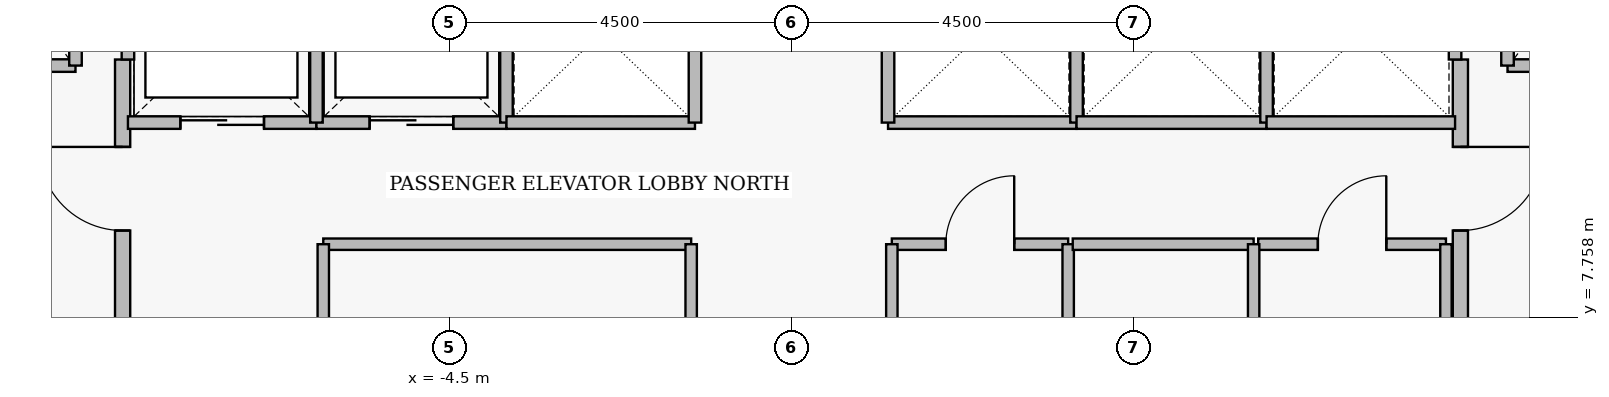
"""IFC4 building model, lengths in metres.
Left out: names, types, materials, properties, quantities, classifications, styles, units other than length and angle.
Written with IfcOpenShell. Run it as: python <this file> out.ifc"""

import sys

from ifc_helpers import new_model, si_unit, direction, frame, frame_2d, origin, place, context, subcontext, project, spatial, rectangle, extrude, element, fill, save


model = new_model("IFC4")
c1 = context("Model", 3, precision=1e-05, world=origin(), true_north=direction((0.0, 1.0)))
c2 = subcontext(c1, "Body", "Model", "MODEL_VIEW")
j1 = project(units=[si_unit("LENGTHUNIT", "METRE"), si_unit("PLANEANGLEUNIT", "RADIAN")], contexts=[c1])
p1 = place(None, origin())
s1 = spatial("IfcSite", under=j1, at=p1, CompositionType="ELEMENT")
p2 = place(p1, origin())
s2 = spatial("IfcBuilding", under=s1, at=p2, CompositionType="ELEMENT")
p3 = place(p2, frame((0.0, 0.0, 128.5)))
s3 = spatial("IfcBuildingStorey", under=s2, at=p3, CompositionType="ELEMENT", Elevation=128.5)
p4 = place(p3, frame((-8.8, 5.05, 0.0), z_axis=(0.0, 0.0, 1.0), x_axis=(0.0, 1.0, 0.0)))
e1 = element("IfcWall", 1, at=p4, inside=s3, PredefinedType="PARTITIONING", context=c2, shape_type="SweptSolid", body=[
    extrude(rectangle(XDim=6.1, YDim=0.2, at=frame_2d((3.05, 0.0))), origin(), (0.0, 0.0, 1.0), 3.43),
])
p5 = place(p4, frame((0.25, 0.0, 0.0)))
e2 = element("IfcOpeningElement", 2, at=p5, cuts=e1, PredefinedType="OPENING", context=c2, shape_type="SweptSolid", body=[
    extrude(rectangle(XDim=1.1, YDim=2.2, at=frame_2d((0.55, 1.1))), frame((0.0, 0.11, 0.0), z_axis=(0.0, -1.0, 0.0), x_axis=(1.0, 0.0, 0.0)), (0.0, 0.0, 1.0), 0.22),
])
p6 = place(p4, frame((3.85, 0.0, 0.0)))
e3 = element("IfcOpeningElement", 3, at=p6, cuts=e1, PredefinedType="OPENING", context=c2, shape_type="SweptSolid", body=[
    extrude(rectangle(XDim=1.1, YDim=2.2, at=frame_2d((0.55, 1.1))), frame((0.0, 0.11, 0.0), z_axis=(0.0, -1.0, 0.0), x_axis=(1.0, 0.0, 0.0)), (0.0, 0.0, 1.0), 0.22),
])
p7 = place(p3, frame((8.8, 11.15, 0.0), z_axis=(0.0, 0.0, 1.0), x_axis=(0.0, -1.0, 0.0)))
e4 = element("IfcWall", 4, at=p7, inside=s3, PredefinedType="PARTITIONING", context=c2, shape_type="SweptSolid", body=[
    extrude(rectangle(XDim=6.1, YDim=0.2, at=frame_2d((3.05, 0.0))), origin(), (0.0, 0.0, 1.0), 3.43),
])
p8 = place(p7, frame((1.15, 0.0, 0.0)))
e5 = element("IfcOpeningElement", 5, at=p8, cuts=e4, PredefinedType="OPENING", context=c2, shape_type="SweptSolid", body=[
    extrude(rectangle(XDim=1.1, YDim=2.2, at=frame_2d((0.55, 1.1))), frame((0.0, 0.11, 0.0), z_axis=(0.0, -1.0, 0.0), x_axis=(1.0, 0.0, 0.0)), (0.0, 0.0, 1.0), 0.22),
])
p9 = place(p7, frame((4.75, 0.0, 0.0)))
e6 = element("IfcOpeningElement", 6, at=p9, cuts=e4, PredefinedType="OPENING", context=c2, shape_type="SweptSolid", body=[
    extrude(rectangle(XDim=1.1, YDim=2.2, at=frame_2d((0.55, 1.1))), frame((0.0, 0.11, 0.0), z_axis=(0.0, -1.0, 0.0), x_axis=(1.0, 0.0, 0.0)), (0.0, 0.0, 1.0), 0.22),
])
p10 = place(p3, frame((-11.58, 11.07, 0.0), z_axis=(0.0, 0.0, 1.0), x_axis=(1.0, 0.0, 0.0)))
e7 = element("IfcWall", 7, at=p10, inside=s3, PredefinedType="PARTITIONING", context=c2, shape_type="SweptSolid", body=[
    extrude(rectangle(XDim=2.16, YDim=0.165, at=frame_2d((1.08, 0.0))), origin(), (0.0, 0.0, 1.0), 3.43),
])
p11 = place(p10, frame((0.53, 0.0, 0.0)))
e8 = element("IfcOpeningElement", 8, at=p11, cuts=e7, PredefinedType="OPENING", context=c2, shape_type="SweptSolid", body=[
    extrude(rectangle(XDim=1.15, YDim=2.25, at=frame_2d((0.575, 1.125))), frame((0.0, 0.093, 0.0), z_axis=(0.0, -1.0, 0.0), x_axis=(1.0, 0.0, 0.0)), (0.0, 0.0, 1.0), 0.185),
])
p12 = place(p3, frame((9.42, 11.07, 0.0), z_axis=(0.0, 0.0, 1.0), x_axis=(1.0, 0.0, 0.0)))
e9 = element("IfcWall", 9, at=p12, inside=s3, PredefinedType="PARTITIONING", context=c2, shape_type="SweptSolid", body=[
    extrude(rectangle(XDim=2.16, YDim=0.165, at=frame_2d((1.08, 0.0))), origin(), (0.0, 0.0, 1.0), 3.43),
])
p13 = place(p12, frame((0.53, 0.0, 0.0)))
e10 = element("IfcOpeningElement", 10, at=p13, cuts=e9, PredefinedType="OPENING", context=c2, shape_type="SweptSolid", body=[
    extrude(rectangle(XDim=1.15, YDim=2.25, at=frame_2d((0.575, 1.125))), frame((0.0, 0.093, 0.0), z_axis=(0.0, -1.0, 0.0), x_axis=(1.0, 0.0, 0.0)), (0.0, 0.0, 1.0), 0.185),
])
p14 = place(p3, frame((-8.73, 10.32, 0.0), z_axis=(0.0, 0.0, 1.0), x_axis=(1.0, 0.0, 0.0)))
e11 = element("IfcWall", 11, at=p14, inside=s3, PredefinedType="PARTITIONING", context=c2, shape_type="SweptSolid", body=[
    extrude(rectangle(XDim=2.48, YDim=0.165, at=frame_2d((1.24, 0.0))), origin(), (0.0, 0.0, 1.0), 3.43),
])
p15 = place(p14, frame((0.69, 0.0, 0.0)))
e12 = element("IfcOpeningElement", 12, at=p15, cuts=e11, PredefinedType="OPENING", context=c2, shape_type="SweptSolid", body=[
    extrude(rectangle(XDim=1.1, YDim=2.25, at=frame_2d((0.55, 1.125))), frame((0.0, 0.093, 0.0), z_axis=(0.0, -1.0, 0.0), x_axis=(1.0, 0.0, 0.0)), (0.0, 0.0, 1.0), 0.185),
])
p16 = place(p3, frame((-6.25, 10.32, 0.0), z_axis=(0.0, 0.0, 1.0), x_axis=(1.0, 0.0, 0.0)))
e13 = element("IfcWall", 13, at=p16, inside=s3, PredefinedType="PARTITIONING", context=c2, shape_type="SweptSolid", body=[
    extrude(rectangle(XDim=2.5, YDim=0.165, at=frame_2d((1.25, 0.0))), origin(), (0.0, 0.0, 1.0), 3.43),
])
p17 = place(p16, frame((0.7, 0.0, 0.0)))
e14 = element("IfcOpeningElement", 14, at=p17, cuts=e13, PredefinedType="OPENING", context=c2, shape_type="SweptSolid", body=[
    extrude(rectangle(XDim=1.1, YDim=2.25, at=frame_2d((0.55, 1.125))), frame((0.0, 0.093, 0.0), z_axis=(0.0, -1.0, 0.0), x_axis=(1.0, 0.0, 0.0)), (0.0, 0.0, 1.0), 0.185),
])
p18 = place(p3, frame((1.32, 8.72, 0.0), z_axis=(0.0, 0.0, 1.0), x_axis=(1.0, 0.0, 0.0)))
e15 = element("IfcWall", 15, at=p18, inside=s3, PredefinedType="PARTITIONING", context=c2, shape_type="SweptSolid", body=[
    extrude(rectangle(XDim=2.32, YDim=0.15, at=frame_2d((1.16, 0.0))), origin(), (0.0, 0.0, 1.0), 3.43),
])
p19 = place(p18, frame((0.71, 0.0, 0.0)))
e16 = element("IfcOpeningElement", 16, at=p19, cuts=e15, PredefinedType="OPENING", context=c2, shape_type="SweptSolid", body=[
    extrude(rectangle(XDim=0.9, YDim=2.15, at=frame_2d((0.45, 1.075))), frame((0.0, 0.085, 0.0), z_axis=(0.0, -1.0, 0.0), x_axis=(1.0, 0.0, 0.0)), (0.0, 0.0, 1.0), 0.17),
])
p20 = place(p3, frame((6.14, 8.72, 0.0), z_axis=(0.0, 0.0, 1.0), x_axis=(1.0, 0.0, 0.0)))
e17 = element("IfcWall", 17, at=p20, inside=s3, PredefinedType="PARTITIONING", context=c2, shape_type="SweptSolid", body=[
    extrude(rectangle(XDim=2.47, YDim=0.15, at=frame_2d((1.235, 0.0))), origin(), (0.0, 0.0, 1.0), 3.43),
])
p21 = place(p20, frame((0.785, 0.0, 0.0)))
e18 = element("IfcOpeningElement", 18, at=p21, cuts=e17, PredefinedType="OPENING", context=c2, shape_type="SweptSolid", body=[
    extrude(rectangle(XDim=0.9, YDim=2.15, at=frame_2d((0.45, 1.075))), frame((0.0, 0.085, 0.0), z_axis=(0.0, -1.0, 0.0), x_axis=(1.0, 0.0, 0.0)), (0.0, 0.0, 1.0), 0.17),
])
for number, where, z_axis, x_axis in (
    (19, (-9.42, 11.07, 0.0), (0.0, 0.0, 1.0), (0.0, 1.0, 0.0)),
    (20, (9.42, 11.07, 0.0), (0.0, 0.0, 1.0), (0.0, 1.0, 0.0)),
):
    element("IfcWall", number, at=place(p3, frame(where, z_axis=z_axis, x_axis=x_axis)), inside=s3, PredefinedType="PARTITIONING", context=c2, shape_type="SweptSolid", body=[
        extrude(rectangle(XDim=2.96, YDim=0.165, at=frame_2d((1.48, 0.0))), origin(), (0.0, 0.0, 1.0), 3.43),
    ])
p22 = place(p3, frame((-8.73, 11.15, 0.0), z_axis=(0.0, 0.0, 1.0), x_axis=(0.0, 1.0, 0.0)))
e21 = element("IfcWall", 21, at=p22, inside=s3, PredefinedType="PARTITIONING", context=c2, shape_type="SweptSolid", body=[
    extrude(rectangle(XDim=1.53, YDim=0.165, at=frame_2d((0.765, 0.0))), origin(), (0.0, 0.0, 1.0), 3.43),
])
for number, where, z_axis, x_axis in (
    (22, (-6.25, 10.32, 0.0), (0.0, 0.0, 1.0), (0.0, 1.0, 0.0)),
    (23, (-3.75, 10.32, 0.0), (0.0, 0.0, 1.0), (0.0, 1.0, 0.0)),
):
    element("IfcWall", number, at=place(p3, frame(where, z_axis=z_axis, x_axis=x_axis)), inside=s3, PredefinedType="PARTITIONING", context=c2, shape_type="SweptSolid", body=[
        extrude(rectangle(XDim=2.36, YDim=0.165, at=frame_2d((1.18, 0.0))), origin(), (0.0, 0.0, 1.0), 3.43),
    ])
p23 = place(p3, frame((-3.75, 10.32, 0.0), z_axis=(0.0, 0.0, 1.0), x_axis=(1.0, 0.0, 0.0)))
e24 = element("IfcWall", 24, at=p23, inside=s3, PredefinedType="PARTITIONING", context=c2, shape_type="SweptSolid", body=[
    extrude(rectangle(XDim=2.48, YDim=0.165, at=frame_2d((1.24, 0.0))), origin(), (0.0, 0.0, 1.0), 3.43),
])
p24 = place(p3, frame((-1.27, 10.32, 0.0), z_axis=(0.0, 0.0, 1.0), x_axis=(0.0, 1.0, 0.0)))
e25 = element("IfcWall", 25, at=p24, inside=s3, PredefinedType="PARTITIONING", context=c2, shape_type="SweptSolid", body=[
    extrude(rectangle(XDim=2.36, YDim=0.165, at=frame_2d((1.18, 0.0))), origin(), (0.0, 0.0, 1.0), 3.43),
])
p25 = place(p3, frame((1.27, 10.32, 0.0), z_axis=(0.0, 0.0, 1.0), x_axis=(1.0, 0.0, 0.0)))
e26 = element("IfcWall", 26, at=p25, inside=s3, PredefinedType="PARTITIONING", context=c2, shape_type="SweptSolid", body=[
    extrude(rectangle(XDim=2.48, YDim=0.165, at=frame_2d((1.24, 0.0))), origin(), (0.0, 0.0, 1.0), 3.43),
])
for number, where, z_axis, x_axis in (
    (27, (1.27, 10.32, 0.0), (0.0, 0.0, 1.0), (0.0, 1.0, 0.0)),
    (28, (3.75, 10.32, 0.0), (0.0, 0.0, 1.0), (0.0, 1.0, 0.0)),
):
    element("IfcWall", number, at=place(p3, frame(where, z_axis=z_axis, x_axis=x_axis)), inside=s3, PredefinedType="PARTITIONING", context=c2, shape_type="SweptSolid", body=[
        extrude(rectangle(XDim=2.36, YDim=0.165, at=frame_2d((1.18, 0.0))), origin(), (0.0, 0.0, 1.0), 3.43),
    ])
p26 = place(p3, frame((3.75, 10.32, 0.0), z_axis=(0.0, 0.0, 1.0), x_axis=(1.0, 0.0, 0.0)))
e29 = element("IfcWall", 29, at=p26, inside=s3, PredefinedType="PARTITIONING", context=c2, shape_type="SweptSolid", body=[
    extrude(rectangle(XDim=2.5, YDim=0.165, at=frame_2d((1.25, 0.0))), origin(), (0.0, 0.0, 1.0), 3.43),
])
p27 = place(p3, frame((6.25, 10.32, 0.0), z_axis=(0.0, 0.0, 1.0), x_axis=(0.0, 1.0, 0.0)))
e30 = element("IfcWall", 30, at=p27, inside=s3, PredefinedType="PARTITIONING", context=c2, shape_type="SweptSolid", body=[
    extrude(rectangle(XDim=2.36, YDim=0.165, at=frame_2d((1.18, 0.0))), origin(), (0.0, 0.0, 1.0), 3.43),
])
p28 = place(p3, frame((6.25, 10.32, 0.0), z_axis=(0.0, 0.0, 1.0), x_axis=(1.0, 0.0, 0.0)))
e31 = element("IfcWall", 31, at=p28, inside=s3, PredefinedType="PARTITIONING", context=c2, shape_type="SweptSolid", body=[
    extrude(rectangle(XDim=2.48, YDim=0.165, at=frame_2d((1.24, 0.0))), origin(), (0.0, 0.0, 1.0), 3.43),
])
p29 = place(p3, frame((8.73, 11.15, 0.0), z_axis=(0.0, 0.0, 1.0), x_axis=(0.0, 1.0, 0.0)))
e32 = element("IfcWall", 32, at=p29, inside=s3, PredefinedType="PARTITIONING", context=c2, shape_type="SweptSolid", body=[
    extrude(rectangle(XDim=1.53, YDim=0.165, at=frame_2d((0.765, 0.0))), origin(), (0.0, 0.0, 1.0), 3.43),
])
p30 = place(p3, frame((-6.16, 8.72, 0.0), z_axis=(0.0, 0.0, 1.0), x_axis=(1.0, 0.0, 0.0)))
e33 = element("IfcWall", 33, at=p30, inside=s3, PredefinedType="PARTITIONING", context=c2, shape_type="SweptSolid", body=[
    extrude(rectangle(XDim=4.84, YDim=0.15, at=frame_2d((2.42, 0.0))), origin(), (0.0, 0.0, 1.0), 3.43),
])
for number, where, z_axis, x_axis in (
    (34, (-6.16, 6.48, 0.0), (0.0, 0.0, 1.0), (0.0, 1.0, 0.0)),
    (35, (-1.32, 6.48, 0.0), (0.0, 0.0, 1.0), (0.0, 1.0, 0.0)),
    (36, (1.32, 6.48, 0.0), (0.0, 0.0, 1.0), (0.0, 1.0, 0.0)),
    (37, (3.64, 6.48, 0.0), (0.0, 0.0, 1.0), (0.0, 1.0, 0.0)),
):
    element("IfcWall", number, at=place(p3, frame(where, z_axis=z_axis, x_axis=x_axis)), inside=s3, PredefinedType="PARTITIONING", context=c2, shape_type="SweptSolid", body=[
        extrude(rectangle(XDim=2.24, YDim=0.15, at=frame_2d((1.12, 0.0))), origin(), (0.0, 0.0, 1.0), 3.43),
    ])
p31 = place(p3, frame((3.7, 8.72, 0.0), z_axis=(0.0, 0.0, 1.0), x_axis=(1.0, 0.0, 0.0)))
e38 = element("IfcWall", 38, at=p31, inside=s3, PredefinedType="PARTITIONING", context=c2, shape_type="SweptSolid", body=[
    extrude(rectangle(XDim=2.38, YDim=0.15, at=frame_2d((1.19, 0.0))), origin(), (0.0, 0.0, 1.0), 3.43),
])
for number, where, z_axis, x_axis in (
    (39, (6.08, 6.48, 0.0), (0.0, 0.0, 1.0), (0.0, 1.0, 0.0)),
    (40, (8.61, 6.48, 0.0), (0.0, 0.0, 1.0), (0.0, 1.0, 0.0)),
):
    element("IfcWall", number, at=place(p3, frame(where, z_axis=z_axis, x_axis=x_axis)), inside=s3, PredefinedType="PARTITIONING", context=c2, shape_type="SweptSolid", body=[
        extrude(rectangle(XDim=2.24, YDim=0.15, at=frame_2d((1.12, 0.0))), origin(), (0.0, 0.0, 1.0), 3.43),
    ])
p32 = place(p6, origin())
e41 = element("IfcDoor", 41, at=p32, inside=s3, OperationType="SINGLE_SWING_RIGHT", PredefinedType="DOOR", context=c2, shape_type="SweptSolid", body=[
    extrude(rectangle(XDim=1.1, YDim=2.2, at=frame_2d((0.55, 1.1))), frame((0.0, 0.025, 0.0), z_axis=(0.0, -1.0, 0.0), x_axis=(1.0, 0.0, 0.0)), (0.0, 0.0, 1.0), 0.05),
])
fill(e3, e41)
p33 = place(p8, origin())
e42 = element("IfcDoor", 42, at=p33, inside=s3, OperationType="SINGLE_SWING_LEFT", PredefinedType="DOOR", context=c2, shape_type="SweptSolid", body=[
    extrude(rectangle(XDim=1.1, YDim=2.2, at=frame_2d((0.55, 1.1))), frame((0.0, 0.025, 0.0), z_axis=(0.0, -1.0, 0.0), x_axis=(1.0, 0.0, 0.0)), (0.0, 0.0, 1.0), 0.05),
])
fill(e5, e42)
p34 = place(p15, origin())
e43 = element("IfcDoor", 43, at=p34, inside=s3, OperationType="SLIDING_TO_LEFT", PredefinedType="DOOR", context=c2, shape_type="SweptSolid", body=[
    extrude(rectangle(XDim=1.1, YDim=2.25, at=frame_2d((0.55, 1.125))), frame((0.0, 0.025, 0.0), z_axis=(0.0, -1.0, 0.0), x_axis=(1.0, 0.0, 0.0)), (0.0, 0.0, 1.0), 0.05),
])
fill(e12, e43)
p35 = place(p17, origin())
e44 = element("IfcDoor", 44, at=p35, inside=s3, OperationType="SLIDING_TO_LEFT", PredefinedType="DOOR", context=c2, shape_type="SweptSolid", body=[
    extrude(rectangle(XDim=1.1, YDim=2.25, at=frame_2d((0.55, 1.125))), frame((0.0, 0.025, 0.0), z_axis=(0.0, -1.0, 0.0), x_axis=(1.0, 0.0, 0.0)), (0.0, 0.0, 1.0), 0.05),
])
fill(e14, e44)
p36 = place(p19, origin())
e45 = element("IfcDoor", 45, at=p36, inside=s3, OperationType="SINGLE_SWING_RIGHT", PredefinedType="DOOR", context=c2, shape_type="SweptSolid", body=[
    extrude(rectangle(XDim=0.9, YDim=2.15, at=frame_2d((0.45, 1.075))), frame((0.0, 0.025, 0.0), z_axis=(0.0, -1.0, 0.0), x_axis=(1.0, 0.0, 0.0)), (0.0, 0.0, 1.0), 0.05),
])
fill(e16, e45)
p37 = place(p21, origin())
e46 = element("IfcDoor", 46, at=p37, inside=s3, OperationType="SINGLE_SWING_RIGHT", PredefinedType="DOOR", context=c2, shape_type="SweptSolid", body=[
    extrude(rectangle(XDim=0.9, YDim=2.15, at=frame_2d((0.45, 1.075))), frame((0.0, 0.025, 0.0), z_axis=(0.0, -1.0, 0.0), x_axis=(1.0, 0.0, 0.0)), (0.0, 0.0, 1.0), 0.05),
])
fill(e18, e46)
save(model, sys.argv[1])
